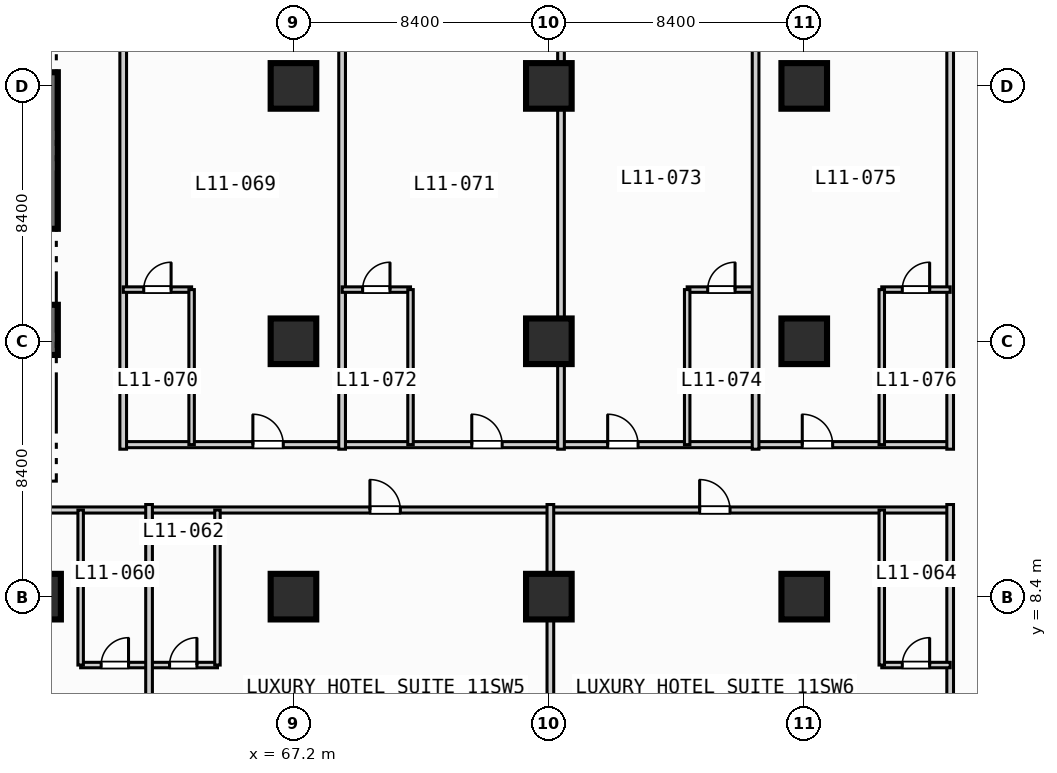
"""IFC4 building model, lengths in metres.
Left out: names, types, materials, properties, quantities, classifications, styles, units other than length and angle.
Written with IfcOpenShell. Run it as: python <this file> out.ifc"""

import sys

from ifc_helpers import new_model, si_unit, direction, frame, frame_2d, origin, origin_2d, place, context, subcontext, project, spatial, rectangle, extrude, element, fill, save


model = new_model("IFC4")
c1 = context("Model", 3, precision=1e-05, world=origin(), true_north=direction((0.0, 1.0)))
c2 = subcontext(c1, "Body", "Model", "MODEL_VIEW")
j1 = project(units=[si_unit("LENGTHUNIT", "METRE"), si_unit("PLANEANGLEUNIT", "RADIAN")], contexts=[c1])
p1 = place(None, origin())
s1 = spatial("IfcSite", under=j1, at=p1, CompositionType="ELEMENT")
p2 = place(p1, origin())
s2 = spatial("IfcBuilding", under=s1, at=p2, CompositionType="ELEMENT")
p3 = place(p2, frame((0.0, 0.0, 51.0)))
s3 = spatial("IfcBuildingStorey", under=s2, at=p3, CompositionType="ELEMENT", Elevation=51.0)
p4 = place(p3, frame((59.0, 16.35, 0.0), z_axis=(0.0, 0.0, 1.0), x_axis=(0.0, 1.0, 0.0)))
e1 = element("IfcWall", 1, at=p4, inside=s3, PredefinedType="SHEAR", context=c2, shape_type="SweptSolid", body=[
    extrude(rectangle(XDim=1.65, YDim=0.9, at=frame_2d((0.825, 0.0))), origin(), (0.0, 0.0, 1.0), 3.55),
])
p5 = place(p3, frame((59.0, 20.5, 0.0), z_axis=(0.0, 0.0, 1.0), x_axis=(0.0, 1.0, 0.0)))
e2 = element("IfcWall", 2, at=p5, inside=s3, PredefinedType="SHEAR", context=c2, shape_type="SweptSolid", body=[
    extrude(rectangle(XDim=5.15, YDim=0.9, at=frame_2d((2.575, 0.0))), origin(), (0.0, 0.0, 1.0), 3.55),
])
for number, where, z_axis, x_axis in (
    (3, (58.8, 8.4, 0.0), (0.0, 0.0, 1.0), (1.0, 0.0, 0.0)),
    (4, (67.2, 8.4, 0.0), (0.0, 0.0, 1.0), (1.0, 0.0, 0.0)),
    (5, (67.2, 16.8, 0.0), (0.0, 0.0, 1.0), (1.0, 0.0, 0.0)),
    (6, (67.2, 25.2, 0.0), (0.0, 0.0, 1.0), (1.0, 0.0, 0.0)),
    (7, (75.6, 8.4, 0.0), (0.0, 0.0, 1.0), (1.0, 0.0, 0.0)),
    (8, (75.6, 16.8, 0.0), (0.0, 0.0, 1.0), (1.0, 0.0, 0.0)),
    (9, (75.6, 25.2, 0.0), (0.0, 0.0, 1.0), (1.0, 0.0, 0.0)),
    (10, (84.0, 8.4, 0.0), (0.0, 0.0, 1.0), (1.0, 0.0, 0.0)),
    (11, (84.0, 16.8, 0.0), (0.0, 0.0, 1.0), (1.0, 0.0, 0.0)),
    (12, (84.0, 25.2, 0.0), (0.0, 0.0, 1.0), (1.0, 0.0, 0.0)),
):
    element("IfcColumn", number, at=place(p3, frame(where, z_axis=z_axis, x_axis=x_axis)), inside=s3, PredefinedType="COLUMN", context=c2, shape_type="SweptSolid", body=[
        extrude(rectangle(XDim=1.5, YDim=1.5, at=origin_2d()), origin(), (0.0, 0.0, 1.0), 3.8),
    ])
p6 = place(p3, frame((13.65, 11.25, 0.0), z_axis=(0.0, 0.0, 1.0), x_axis=(1.0, 0.0, 0.0)))
e13 = element("IfcWall", 13, at=p6, inside=s3, PredefinedType="PARTITIONING", context=c2, shape_type="SweptSolid", body=[
    extrude(rectangle(XDim=75.15, YDim=0.2, at=frame_2d((37.575, 0.0))), origin(), (0.0, 0.0, 1.0), 3.55),
])
p7 = place(p6, frame((7.265, 0.0, 0.0)))
e14 = element("IfcOpeningElement", 14, at=p7, cuts=e13, PredefinedType="OPENING", context=c2, shape_type="SweptSolid", body=[
    extrude(rectangle(XDim=1.0, YDim=2.15, at=frame_2d((0.5, 1.075))), frame((0.0, 0.11, 0.0), z_axis=(0.0, -1.0, 0.0), x_axis=(1.0, 0.0, 0.0)), (0.0, 0.0, 1.0), 0.22),
])
p8 = place(p6, frame((17.135, 0.0, 0.0)))
e15 = element("IfcOpeningElement", 15, at=p8, cuts=e13, PredefinedType="OPENING", context=c2, shape_type="SweptSolid", body=[
    extrude(rectangle(XDim=1.0, YDim=2.15, at=frame_2d((0.5, 1.075))), frame((0.0, 0.11, 0.0), z_axis=(0.0, -1.0, 0.0), x_axis=(1.0, 0.0, 0.0)), (0.0, 0.0, 1.0), 0.22),
])
p9 = place(p6, frame((31.665, 0.0, 0.0)))
e16 = element("IfcOpeningElement", 16, at=p9, cuts=e13, PredefinedType="OPENING", context=c2, shape_type="SweptSolid", body=[
    extrude(rectangle(XDim=1.0, YDim=2.15, at=frame_2d((0.5, 1.075))), frame((0.0, 0.11, 0.0), z_axis=(0.0, -1.0, 0.0), x_axis=(1.0, 0.0, 0.0)), (0.0, 0.0, 1.0), 0.22),
])
p10 = place(p6, frame((41.535, 0.0, 0.0)))
e17 = element("IfcOpeningElement", 17, at=p10, cuts=e13, PredefinedType="OPENING", context=c2, shape_type="SweptSolid", body=[
    extrude(rectangle(XDim=1.0, YDim=2.15, at=frame_2d((0.5, 1.075))), frame((0.0, 0.11, 0.0), z_axis=(0.0, -1.0, 0.0), x_axis=(1.0, 0.0, 0.0)), (0.0, 0.0, 1.0), 0.22),
])
p11 = place(p6, frame((56.065, 0.0, 0.0)))
e18 = element("IfcOpeningElement", 18, at=p11, cuts=e13, PredefinedType="OPENING", context=c2, shape_type="SweptSolid", body=[
    extrude(rectangle(XDim=1.0, YDim=2.15, at=frame_2d((0.5, 1.075))), frame((0.0, 0.11, 0.0), z_axis=(0.0, -1.0, 0.0), x_axis=(1.0, 0.0, 0.0)), (0.0, 0.0, 1.0), 0.22),
])
p12 = place(p6, frame((66.91, 0.0, 0.0)))
e19 = element("IfcOpeningElement", 19, at=p12, cuts=e13, PredefinedType="OPENING", context=c2, shape_type="SweptSolid", body=[
    extrude(rectangle(XDim=1.0, YDim=2.15, at=frame_2d((0.5, 1.075))), frame((0.0, 0.11, 0.0), z_axis=(0.0, -1.0, 0.0), x_axis=(1.0, 0.0, 0.0)), (0.0, 0.0, 1.0), 0.22),
])
p13 = place(p3, frame((60.2, 6.15, 0.0), z_axis=(0.0, 0.0, 1.0), x_axis=(1.0, 0.0, 0.0)))
e20 = element("IfcWall", 20, at=p13, inside=s3, PredefinedType="PLUMBINGWALL", context=c2, shape_type="SweptSolid", body=[
    extrude(rectangle(XDim=4.5, YDim=0.18, at=frame_2d((2.25, 0.0))), origin(), (0.0, 0.0, 1.0), 3.55),
])
p14 = place(p13, frame((0.675, 0.0, 0.0)))
e21 = element("IfcOpeningElement", 21, at=p14, cuts=e20, PredefinedType="OPENING", context=c2, shape_type="SweptSolid", body=[
    extrude(rectangle(XDim=0.9, YDim=2.1, at=frame_2d((0.45, 1.05))), frame((0.0, 0.1, 0.0), z_axis=(0.0, -1.0, 0.0), x_axis=(1.0, 0.0, 0.0)), (0.0, 0.0, 1.0), 0.2),
])
p15 = place(p13, frame((2.925, 0.0, 0.0)))
e22 = element("IfcOpeningElement", 22, at=p15, cuts=e20, PredefinedType="OPENING", context=c2, shape_type="SweptSolid", body=[
    extrude(rectangle(XDim=0.9, YDim=2.1, at=frame_2d((0.45, 1.05))), frame((0.0, 0.1, 0.0), z_axis=(0.0, -1.0, 0.0), x_axis=(1.0, 0.0, 0.0)), (0.0, 0.0, 1.0), 0.2),
])
p16 = place(p3, frame((60.2, 6.15, 0.0), z_axis=(0.0, 0.0, 1.0), x_axis=(0.0, 1.0, 0.0)))
e23 = element("IfcWall", 23, at=p16, inside=s3, PredefinedType="PLUMBINGWALL", context=c2, shape_type="SweptSolid", body=[
    extrude(rectangle(XDim=5.1, YDim=0.18, at=frame_2d((2.55, 0.0))), origin(), (0.0, 0.0, 1.0), 3.55),
])
p17 = place(p3, frame((62.45, 0.2, 0.0), z_axis=(0.0, 0.0, 1.0), x_axis=(0.0, 1.0, 0.0)))
e24 = element("IfcWall", 24, at=p17, inside=s3, PredefinedType="PARTITIONING", context=c2, shape_type="SweptSolid", body=[
    extrude(rectangle(XDim=11.23, YDim=0.22, at=frame_2d((5.615, 0.0))), origin(), (0.0, 0.0, 1.0), 3.55),
])
p18 = place(p3, frame((64.7, 6.15, 0.0), z_axis=(0.0, 0.0, 1.0), x_axis=(0.0, 1.0, 0.0)))
e25 = element("IfcWall", 25, at=p18, inside=s3, PredefinedType="PLUMBINGWALL", context=c2, shape_type="SweptSolid", body=[
    extrude(rectangle(XDim=5.1, YDim=0.18, at=frame_2d((2.55, 0.0))), origin(), (0.0, 0.0, 1.0), 3.55),
])
p19 = place(p3, frame((75.65, 0.2, 0.0), z_axis=(0.0, 0.0, 1.0), x_axis=(0.0, 1.0, 0.0)))
e26 = element("IfcWall", 26, at=p19, inside=s3, PredefinedType="PARTITIONING", context=c2, shape_type="SweptSolid", body=[
    extrude(rectangle(XDim=11.23, YDim=0.22, at=frame_2d((5.615, 0.0))), origin(), (0.0, 0.0, 1.0), 2.8),
])
p20 = place(p3, frame((88.8, 0.2, 0.0), z_axis=(0.0, 0.0, 1.0), x_axis=(0.0, 1.0, 0.0)))
e27 = element("IfcWall", 27, at=p20, inside=s3, PredefinedType="PARTITIONING", context=c2, shape_type="SweptSolid", body=[
    extrude(rectangle(XDim=11.23, YDim=0.22, at=frame_2d((5.615, 0.0))), origin(), (0.0, 0.0, 1.0), 3.55),
])
p21 = place(p3, frame((86.55, 6.15, 0.0), z_axis=(0.0, 0.0, 1.0), x_axis=(1.0, 0.0, 0.0)))
e28 = element("IfcWall", 28, at=p21, inside=s3, PredefinedType="PLUMBINGWALL", context=c2, shape_type="SweptSolid", body=[
    extrude(rectangle(XDim=2.25, YDim=0.18, at=frame_2d((1.125, 0.0))), origin(), (0.0, 0.0, 1.0), 3.55),
])
p22 = place(p21, frame((0.675, 0.0, 0.0)))
e29 = element("IfcOpeningElement", 29, at=p22, cuts=e28, PredefinedType="OPENING", context=c2, shape_type="SweptSolid", body=[
    extrude(rectangle(XDim=0.9, YDim=2.1, at=frame_2d((0.45, 1.05))), frame((0.0, 0.1, 0.0), z_axis=(0.0, -1.0, 0.0), x_axis=(1.0, 0.0, 0.0)), (0.0, 0.0, 1.0), 0.2),
])
p23 = place(p3, frame((86.55, 6.15, 0.0), z_axis=(0.0, 0.0, 1.0), x_axis=(0.0, 1.0, 0.0)))
e30 = element("IfcWall", 30, at=p23, inside=s3, PredefinedType="PLUMBINGWALL", context=c2, shape_type="SweptSolid", body=[
    extrude(rectangle(XDim=5.1, YDim=0.18, at=frame_2d((2.55, 0.0))), origin(), (0.0, 0.0, 1.0), 3.55),
])
p24 = place(p3, frame((61.6, 13.4, 0.0), z_axis=(0.0, 0.0, 1.0), x_axis=(1.0, 0.0, 0.0)))
e31 = element("IfcWall", 31, at=p24, inside=s3, PredefinedType="PARTITIONING", context=c2, shape_type="SweptSolid", body=[
    extrude(rectangle(XDim=27.2, YDim=0.2, at=frame_2d((13.6, 0.0))), origin(), (0.0, 0.0, 1.0), 3.55),
])
p25 = place(p24, frame((4.265, 0.0, 0.0)))
e32 = element("IfcOpeningElement", 32, at=p25, cuts=e31, PredefinedType="OPENING", context=c2, shape_type="SweptSolid", body=[
    extrude(rectangle(XDim=1.0, YDim=2.15, at=frame_2d((0.5, 1.075))), frame((0.0, 0.11, 0.0), z_axis=(0.0, -1.0, 0.0), x_axis=(1.0, 0.0, 0.0)), (0.0, 0.0, 1.0), 0.22),
])
p26 = place(p24, frame((11.465, 0.0, 0.0)))
e33 = element("IfcOpeningElement", 33, at=p26, cuts=e31, PredefinedType="OPENING", context=c2, shape_type="SweptSolid", body=[
    extrude(rectangle(XDim=1.0, YDim=2.15, at=frame_2d((0.5, 1.075))), frame((0.0, 0.11, 0.0), z_axis=(0.0, -1.0, 0.0), x_axis=(1.0, 0.0, 0.0)), (0.0, 0.0, 1.0), 0.22),
])
p27 = place(p24, frame((15.935, 0.0, 0.0)))
e34 = element("IfcOpeningElement", 34, at=p27, cuts=e31, PredefinedType="OPENING", context=c2, shape_type="SweptSolid", body=[
    extrude(rectangle(XDim=1.0, YDim=2.15, at=frame_2d((0.5, 1.075))), frame((0.0, 0.11, 0.0), z_axis=(0.0, -1.0, 0.0), x_axis=(1.0, 0.0, 0.0)), (0.0, 0.0, 1.0), 0.22),
])
p28 = place(p24, frame((22.335, 0.0, 0.0)))
e35 = element("IfcOpeningElement", 35, at=p28, cuts=e31, PredefinedType="OPENING", context=c2, shape_type="SweptSolid", body=[
    extrude(rectangle(XDim=1.0, YDim=2.15, at=frame_2d((0.5, 1.075))), frame((0.0, 0.11, 0.0), z_axis=(0.0, -1.0, 0.0), x_axis=(1.0, 0.0, 0.0)), (0.0, 0.0, 1.0), 0.22),
])
p29 = place(p3, frame((61.6, 13.25, 0.0), z_axis=(0.0, 0.0, 1.0), x_axis=(0.0, 1.0, 0.0)))
e36 = element("IfcWall", 36, at=p29, inside=s3, PredefinedType="PARTITIONING", context=c2, shape_type="SweptSolid", body=[
    extrude(rectangle(XDim=20.18, YDim=0.22, at=frame_2d((10.09, 0.0))), origin(), (0.0, 0.0, 1.0), 3.55),
])
p30 = place(p3, frame((61.6, 18.5, 0.0), z_axis=(0.0, 0.0, 1.0), x_axis=(1.0, 0.0, 0.0)))
e37 = element("IfcWall", 37, at=p30, inside=s3, PredefinedType="PLUMBINGWALL", context=c2, shape_type="SweptSolid", body=[
    extrude(rectangle(XDim=2.25, YDim=0.18, at=frame_2d((1.125, 0.0))), origin(), (0.0, 0.0, 1.0), 3.55),
])
p31 = place(p30, frame((0.675, 0.0, 0.0)))
e38 = element("IfcOpeningElement", 38, at=p31, cuts=e37, PredefinedType="OPENING", context=c2, shape_type="SweptSolid", body=[
    extrude(rectangle(XDim=0.9, YDim=2.1, at=frame_2d((0.45, 1.05))), frame((0.0, 0.1, 0.0), z_axis=(0.0, -1.0, 0.0), x_axis=(1.0, 0.0, 0.0)), (0.0, 0.0, 1.0), 0.2),
])
p32 = place(p3, frame((63.85, 13.4, 0.0), z_axis=(0.0, 0.0, 1.0), x_axis=(0.0, 1.0, 0.0)))
e39 = element("IfcWall", 39, at=p32, inside=s3, PredefinedType="PLUMBINGWALL", context=c2, shape_type="SweptSolid", body=[
    extrude(rectangle(XDim=5.1, YDim=0.18, at=frame_2d((2.55, 0.0))), origin(), (0.0, 0.0, 1.0), 3.55),
])
p33 = place(p3, frame((68.8, 13.25, 0.0), z_axis=(0.0, 0.0, 1.0), x_axis=(0.0, 1.0, 0.0)))
e40 = element("IfcWall", 40, at=p33, inside=s3, PredefinedType="PARTITIONING", context=c2, shape_type="SweptSolid", body=[
    extrude(rectangle(XDim=20.18, YDim=0.22, at=frame_2d((10.09, 0.0))), origin(), (0.0, 0.0, 1.0), 3.55),
])
p34 = place(p3, frame((68.8, 18.5, 0.0), z_axis=(0.0, 0.0, 1.0), x_axis=(1.0, 0.0, 0.0)))
e41 = element("IfcWall", 41, at=p34, inside=s3, PredefinedType="PLUMBINGWALL", context=c2, shape_type="SweptSolid", body=[
    extrude(rectangle(XDim=2.25, YDim=0.18, at=frame_2d((1.125, 0.0))), origin(), (0.0, 0.0, 1.0), 3.55),
])
p35 = place(p34, frame((0.675, 0.0, 0.0)))
e42 = element("IfcOpeningElement", 42, at=p35, cuts=e41, PredefinedType="OPENING", context=c2, shape_type="SweptSolid", body=[
    extrude(rectangle(XDim=0.9, YDim=2.1, at=frame_2d((0.45, 1.05))), frame((0.0, 0.1, 0.0), z_axis=(0.0, -1.0, 0.0), x_axis=(1.0, 0.0, 0.0)), (0.0, 0.0, 1.0), 0.2),
])
p36 = place(p3, frame((71.05, 13.4, 0.0), z_axis=(0.0, 0.0, 1.0), x_axis=(0.0, 1.0, 0.0)))
e43 = element("IfcWall", 43, at=p36, inside=s3, PredefinedType="PLUMBINGWALL", context=c2, shape_type="SweptSolid", body=[
    extrude(rectangle(XDim=5.1, YDim=0.18, at=frame_2d((2.55, 0.0))), origin(), (0.0, 0.0, 1.0), 3.55),
])
p37 = place(p3, frame((76.0, 13.25, 0.0), z_axis=(0.0, 0.0, 1.0), x_axis=(0.0, 1.0, 0.0)))
e44 = element("IfcWall", 44, at=p37, inside=s3, PredefinedType="PARTITIONING", context=c2, shape_type="SweptSolid", body=[
    extrude(rectangle(XDim=20.18, YDim=0.22, at=frame_2d((10.09, 0.0))), origin(), (0.0, 0.0, 1.0), 3.55),
])
p38 = place(p3, frame((80.15, 18.5, 0.0), z_axis=(0.0, 0.0, 1.0), x_axis=(1.0, 0.0, 0.0)))
e45 = element("IfcWall", 45, at=p38, inside=s3, PredefinedType="PLUMBINGWALL", context=c2, shape_type="SweptSolid", body=[
    extrude(rectangle(XDim=2.25, YDim=0.18, at=frame_2d((1.125, 0.0))), origin(), (0.0, 0.0, 1.0), 3.55),
])
p39 = place(p38, frame((0.675, 0.0, 0.0)))
e46 = element("IfcOpeningElement", 46, at=p39, cuts=e45, PredefinedType="OPENING", context=c2, shape_type="SweptSolid", body=[
    extrude(rectangle(XDim=0.9, YDim=2.1, at=frame_2d((0.45, 1.05))), frame((0.0, 0.1, 0.0), z_axis=(0.0, -1.0, 0.0), x_axis=(1.0, 0.0, 0.0)), (0.0, 0.0, 1.0), 0.2),
])
p40 = place(p3, frame((80.15, 13.4, 0.0), z_axis=(0.0, 0.0, 1.0), x_axis=(0.0, 1.0, 0.0)))
e47 = element("IfcWall", 47, at=p40, inside=s3, PredefinedType="PLUMBINGWALL", context=c2, shape_type="SweptSolid", body=[
    extrude(rectangle(XDim=5.1, YDim=0.18, at=frame_2d((2.55, 0.0))), origin(), (0.0, 0.0, 1.0), 3.55),
])
for number, where, z_axis, x_axis in (
    (48, (82.4, 13.25, 0.0), (0.0, 0.0, 1.0), (0.0, 1.0, 0.0)),
    (49, (88.8, 13.25, 0.0), (0.0, 0.0, 1.0), (0.0, 1.0, 0.0)),
):
    element("IfcWall", number, at=place(p3, frame(where, z_axis=z_axis, x_axis=x_axis)), inside=s3, PredefinedType="PARTITIONING", context=c2, shape_type="SweptSolid", body=[
        extrude(rectangle(XDim=20.18, YDim=0.22, at=frame_2d((10.09, 0.0))), origin(), (0.0, 0.0, 1.0), 3.55),
    ])
p41 = place(p3, frame((86.55, 18.5, 0.0), z_axis=(0.0, 0.0, 1.0), x_axis=(1.0, 0.0, 0.0)))
e50 = element("IfcWall", 50, at=p41, inside=s3, PredefinedType="PLUMBINGWALL", context=c2, shape_type="SweptSolid", body=[
    extrude(rectangle(XDim=2.25, YDim=0.18, at=frame_2d((1.125, 0.0))), origin(), (0.0, 0.0, 1.0), 3.55),
])
p42 = place(p41, frame((0.675, 0.0, 0.0)))
e51 = element("IfcOpeningElement", 51, at=p42, cuts=e50, PredefinedType="OPENING", context=c2, shape_type="SweptSolid", body=[
    extrude(rectangle(XDim=0.9, YDim=2.1, at=frame_2d((0.45, 1.05))), frame((0.0, 0.1, 0.0), z_axis=(0.0, -1.0, 0.0), x_axis=(1.0, 0.0, 0.0)), (0.0, 0.0, 1.0), 0.2),
])
p43 = place(p3, frame((86.55, 13.4, 0.0), z_axis=(0.0, 0.0, 1.0), x_axis=(0.0, 1.0, 0.0)))
e52 = element("IfcWall", 52, at=p43, inside=s3, PredefinedType="PLUMBINGWALL", context=c2, shape_type="SweptSolid", body=[
    extrude(rectangle(XDim=5.1, YDim=0.18, at=frame_2d((2.55, 0.0))), origin(), (0.0, 0.0, 1.0), 3.55),
])
p44 = place(p11, origin())
e53 = element("IfcDoor", 53, at=p44, inside=s3, OperationType="SINGLE_SWING_LEFT", PredefinedType="DOOR", context=c2, shape_type="SweptSolid", body=[
    extrude(rectangle(XDim=1.0, YDim=2.15, at=frame_2d((0.5, 1.075))), frame((0.0, 0.025, 0.0), z_axis=(0.0, -1.0, 0.0), x_axis=(1.0, 0.0, 0.0)), (0.0, 0.0, 1.0), 0.05),
])
fill(e18, e53)
p45 = place(p12, origin())
e54 = element("IfcDoor", 54, at=p45, inside=s3, OperationType="SINGLE_SWING_LEFT", PredefinedType="DOOR", context=c2, shape_type="SweptSolid", body=[
    extrude(rectangle(XDim=1.0, YDim=2.15, at=frame_2d((0.5, 1.075))), frame((0.0, 0.025, 0.0), z_axis=(0.0, -1.0, 0.0), x_axis=(1.0, 0.0, 0.0)), (0.0, 0.0, 1.0), 0.05),
])
fill(e19, e54)
p46 = place(p14, origin())
e55 = element("IfcDoor", 55, at=p46, inside=s3, OperationType="SINGLE_SWING_RIGHT", PredefinedType="DOOR", context=c2, shape_type="SweptSolid", body=[
    extrude(rectangle(XDim=0.9, YDim=2.1, at=frame_2d((0.45, 1.05))), frame((0.0, 0.025, 0.0), z_axis=(0.0, -1.0, 0.0), x_axis=(1.0, 0.0, 0.0)), (0.0, 0.0, 1.0), 0.05),
])
fill(e21, e55)
p47 = place(p15, origin())
e56 = element("IfcDoor", 56, at=p47, inside=s3, OperationType="SINGLE_SWING_RIGHT", PredefinedType="DOOR", context=c2, shape_type="SweptSolid", body=[
    extrude(rectangle(XDim=0.9, YDim=2.1, at=frame_2d((0.45, 1.05))), frame((0.0, 0.025, 0.0), z_axis=(0.0, -1.0, 0.0), x_axis=(1.0, 0.0, 0.0)), (0.0, 0.0, 1.0), 0.05),
])
fill(e22, e56)
p48 = place(p22, origin())
e57 = element("IfcDoor", 57, at=p48, inside=s3, OperationType="SINGLE_SWING_RIGHT", PredefinedType="DOOR", context=c2, shape_type="SweptSolid", body=[
    extrude(rectangle(XDim=0.9, YDim=2.1, at=frame_2d((0.45, 1.05))), frame((0.0, 0.025, 0.0), z_axis=(0.0, -1.0, 0.0), x_axis=(1.0, 0.0, 0.0)), (0.0, 0.0, 1.0), 0.05),
])
fill(e29, e57)
p49 = place(p25, origin())
e58 = element("IfcDoor", 58, at=p49, inside=s3, OperationType="SINGLE_SWING_LEFT", PredefinedType="DOOR", context=c2, shape_type="SweptSolid", body=[
    extrude(rectangle(XDim=1.0, YDim=2.15, at=frame_2d((0.5, 1.075))), frame((0.0, 0.025, 0.0), z_axis=(0.0, -1.0, 0.0), x_axis=(1.0, 0.0, 0.0)), (0.0, 0.0, 1.0), 0.05),
])
fill(e32, e58)
p50 = place(p26, origin())
e59 = element("IfcDoor", 59, at=p50, inside=s3, OperationType="SINGLE_SWING_LEFT", PredefinedType="DOOR", context=c2, shape_type="SweptSolid", body=[
    extrude(rectangle(XDim=1.0, YDim=2.15, at=frame_2d((0.5, 1.075))), frame((0.0, 0.025, 0.0), z_axis=(0.0, -1.0, 0.0), x_axis=(1.0, 0.0, 0.0)), (0.0, 0.0, 1.0), 0.05),
])
fill(e33, e59)
p51 = place(p27, origin())
e60 = element("IfcDoor", 60, at=p51, inside=s3, OperationType="SINGLE_SWING_LEFT", PredefinedType="DOOR", context=c2, shape_type="SweptSolid", body=[
    extrude(rectangle(XDim=1.0, YDim=2.15, at=frame_2d((0.5, 1.075))), frame((0.0, 0.025, 0.0), z_axis=(0.0, -1.0, 0.0), x_axis=(1.0, 0.0, 0.0)), (0.0, 0.0, 1.0), 0.05),
])
fill(e34, e60)
p52 = place(p28, origin())
e61 = element("IfcDoor", 61, at=p52, inside=s3, OperationType="SINGLE_SWING_LEFT", PredefinedType="DOOR", context=c2, shape_type="SweptSolid", body=[
    extrude(rectangle(XDim=1.0, YDim=2.15, at=frame_2d((0.5, 1.075))), frame((0.0, 0.025, 0.0), z_axis=(0.0, -1.0, 0.0), x_axis=(1.0, 0.0, 0.0)), (0.0, 0.0, 1.0), 0.05),
])
fill(e35, e61)
p53 = place(p31, origin())
e62 = element("IfcDoor", 62, at=p53, inside=s3, OperationType="SINGLE_SWING_RIGHT", PredefinedType="DOOR", context=c2, shape_type="SweptSolid", body=[
    extrude(rectangle(XDim=0.9, YDim=2.1, at=frame_2d((0.45, 1.05))), frame((0.0, 0.025, 0.0), z_axis=(0.0, -1.0, 0.0), x_axis=(1.0, 0.0, 0.0)), (0.0, 0.0, 1.0), 0.05),
])
fill(e38, e62)
p54 = place(p35, origin())
e63 = element("IfcDoor", 63, at=p54, inside=s3, OperationType="SINGLE_SWING_RIGHT", PredefinedType="DOOR", context=c2, shape_type="SweptSolid", body=[
    extrude(rectangle(XDim=0.9, YDim=2.1, at=frame_2d((0.45, 1.05))), frame((0.0, 0.025, 0.0), z_axis=(0.0, -1.0, 0.0), x_axis=(1.0, 0.0, 0.0)), (0.0, 0.0, 1.0), 0.05),
])
fill(e42, e63)
p55 = place(p39, origin())
e64 = element("IfcDoor", 64, at=p55, inside=s3, OperationType="SINGLE_SWING_RIGHT", PredefinedType="DOOR", context=c2, shape_type="SweptSolid", body=[
    extrude(rectangle(XDim=0.9, YDim=2.1, at=frame_2d((0.45, 1.05))), frame((0.0, 0.025, 0.0), z_axis=(0.0, -1.0, 0.0), x_axis=(1.0, 0.0, 0.0)), (0.0, 0.0, 1.0), 0.05),
])
fill(e46, e64)
p56 = place(p42, origin())
e65 = element("IfcDoor", 65, at=p56, inside=s3, OperationType="SINGLE_SWING_RIGHT", PredefinedType="DOOR", context=c2, shape_type="SweptSolid", body=[
    extrude(rectangle(XDim=0.9, YDim=2.1, at=frame_2d((0.45, 1.05))), frame((0.0, 0.025, 0.0), z_axis=(0.0, -1.0, 0.0), x_axis=(1.0, 0.0, 0.0)), (0.0, 0.0, 1.0), 0.05),
])
fill(e51, e65)
save(model, sys.argv[1])
